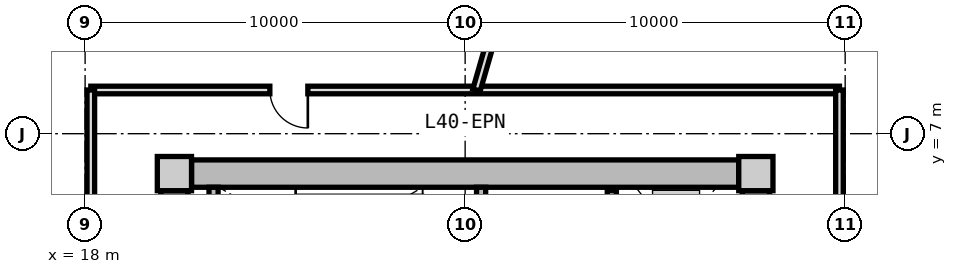
"""IFC4 building model, lengths in metres.
Left out: names, types, materials, properties, quantities, classifications, styles, units other than length and angle.
Written with IfcOpenShell. Run it as: python <this file> out.ifc"""

import sys

from ifc_helpers import new_model, si_unit, direction, frame, frame_2d, origin, origin_2d, place, context, subcontext, project, spatial, rectangle, extrude, source, transform, mapped, element, fill, save


model = new_model("IFC4")
c1 = context("Model", 3, precision=1e-05, world=origin(), true_north=direction((0.0, 1.0)))
c2 = subcontext(c1, "Body", "Model", "MODEL_VIEW")
j1 = project(units=[si_unit("LENGTHUNIT", "METRE"), si_unit("PLANEANGLEUNIT", "RADIAN")], contexts=[c1])
p1 = place(None, origin())
s1 = spatial("IfcSite", under=j1, at=p1, CompositionType="ELEMENT")
p2 = place(p1, origin())
s2 = spatial("IfcBuilding", under=s1, at=p2, CompositionType="ELEMENT")
p3 = place(p2, frame((0.0, 0.0, 129.8)))
s3 = spatial("IfcBuildingStorey", under=s2, at=p3, CompositionType="ELEMENT", Elevation=129.8)
m1 = source(origin(), c2, "Body", "SweptSolid", [
    extrude(rectangle(XDim=0.9, YDim=0.9, at=origin_2d()), origin(), (0.0, 0.0, 1.0), 4.5),
])
for number, where, z_axis, x_axis in (
    (1, (35.65, 5.95, 0.0), (0.0, 0.0, 1.0), (1.0, 0.0, 0.0)),
    (2, (20.35, 5.95, 0.0), (0.0, 0.0, 1.0), (1.0, 0.0, 0.0)),
):
    element("IfcColumn", number, at=place(p3, frame(where, z_axis=z_axis, x_axis=x_axis)), inside=s3, PredefinedType="COLUMN", context=c2, shape_type="MappedRepresentation", body=[
        mapped(m1, transform((0.0, 0.0, 0.0), x_axis=(1.0, 0.0, 0.0), y_axis=(0.0, 1.0, 0.0), z_axis=(0.0, 0.0, 1.0), scale=1.0)),
    ])
m2 = source(origin(), c2, "Body", "SweptSolid", [
    extrude(rectangle(XDim=14.4, YDim=0.72, at=frame_2d((7.2, 0.0))), origin(), (0.0, 0.0, 1.0), 4.08),
])
p4 = place(p3, frame((20.8, 5.95, 0.0), z_axis=(0.0, 0.0, 1.0), x_axis=(1.0, 0.0, 0.0)))
e3 = element("IfcWall", 3, at=p4, inside=s3, PredefinedType="SHEAR", context=c2, shape_type="MappedRepresentation", body=[
    mapped(m2, transform((0.0, 0.0, 0.0), x_axis=(1.0, 0.0, 0.0), y_axis=(0.0, 1.0, 0.0), z_axis=(0.0, 0.0, 1.0), scale=1.0)),
])
m3 = source(origin(), c2, "Body", "SweptSolid", [
    extrude(rectangle(XDim=11.0, YDim=0.72, at=frame_2d((5.5, 0.0))), origin(), (0.0, 0.0, 1.0), 4.08),
])
p5 = place(p3, frame((20.35, -5.5, 0.0), z_axis=(0.0, 0.0, 1.0), x_axis=(0.0, 1.0, 0.0)))
e4 = element("IfcWall", 4, at=p5, inside=s3, PredefinedType="SHEAR", context=c2, shape_type="MappedRepresentation", body=[
    mapped(m3, transform((0.0, 0.0, 0.0), x_axis=(1.0, 0.0, 0.0), y_axis=(0.0, 1.0, 0.0), z_axis=(0.0, 0.0, 1.0), scale=1.0)),
])
p6 = place(p5, frame((3.8, 0.0, 0.0)))
e5 = element("IfcOpeningElement", 5, at=p6, cuts=e4, PredefinedType="OPENING", context=c2, shape_type="SweptSolid", body=[
    extrude(rectangle(XDim=1.2, YDim=2.15, at=frame_2d((0.6, 1.075))), frame((0.0, 0.37, 0.0), z_axis=(0.0, -1.0, 0.0), x_axis=(1.0, 0.0, 0.0)), (0.0, 0.0, 1.0), 0.74),
])
p7 = place(p3, frame((35.65, 5.5, 0.0), z_axis=(0.0, 0.0, 1.0), x_axis=(0.0, -1.0, 0.0)))
e6 = element("IfcWall", 6, at=p7, inside=s3, PredefinedType="SHEAR", context=c2, shape_type="MappedRepresentation", body=[
    mapped(m3, transform((0.0, 0.0, 0.0), x_axis=(1.0, 0.0, 0.0), y_axis=(0.0, 1.0, 0.0), z_axis=(0.0, 0.0, 1.0), scale=1.0)),
])
p8 = place(p7, frame((5.65, 0.0, 0.0)))
e7 = element("IfcOpeningElement", 7, at=p8, cuts=e6, PredefinedType="OPENING", context=c2, shape_type="SweptSolid", body=[
    extrude(rectangle(XDim=1.2, YDim=2.15, at=frame_2d((0.6, 1.075))), frame((0.0, 0.37, 0.0), z_axis=(0.0, -1.0, 0.0), x_axis=(1.0, 0.0, 0.0)), (0.0, 0.0, 1.0), 0.74),
])
p9 = place(p7, frame((9.3, 0.0, 0.0)))
e8 = element("IfcOpeningElement", 8, at=p9, cuts=e6, PredefinedType="OPENING", context=c2, shape_type="SweptSolid", body=[
    extrude(rectangle(XDim=1.0, YDim=2.1, at=frame_2d((0.5, 1.05))), frame((0.0, 0.37, 0.0), z_axis=(0.0, -1.0, 0.0), x_axis=(1.0, 0.0, 0.0)), (0.0, 0.0, 1.0), 0.74),
])
m4 = source(origin(), c2, "Body", "SweptSolid", [
    extrude(rectangle(XDim=3.14, YDim=0.24, at=frame_2d((1.57, 0.0))), origin(), (0.0, 0.0, 1.0), 4.08),
])
p10 = place(p3, frame((21.38, 2.45, 0.0), z_axis=(0.0, 0.0, 1.0), x_axis=(0.0, 1.0, 0.0)))
e9 = element("IfcWall", 9, at=p10, inside=s3, PredefinedType="PARTITIONING", context=c2, shape_type="MappedRepresentation", body=[
    mapped(m4, transform((0.0, 0.0, 0.0), x_axis=(1.0, 0.0, 0.0), y_axis=(0.0, 1.0, 0.0), z_axis=(0.0, 0.0, 1.0), scale=1.0)),
])
p11 = place(p3, frame((28.42, 2.45, 0.0), z_axis=(0.0, 0.0, 1.0), x_axis=(0.0, 1.0, 0.0)))
e10 = element("IfcWall", 10, at=p11, inside=s3, PredefinedType="PARTITIONING", context=c2, shape_type="MappedRepresentation", body=[
    mapped(m4, transform((0.0, 0.0, 0.0), x_axis=(1.0, 0.0, 0.0), y_axis=(0.0, 1.0, 0.0), z_axis=(0.0, 0.0, 1.0), scale=1.0)),
])
p12 = place(p11, frame((0.55, 0.0, 0.0)))
e11 = element("IfcOpeningElement", 11, at=p12, cuts=e10, PredefinedType="OPENING", context=c2, shape_type="SweptSolid", body=[
    extrude(rectangle(XDim=1.1, YDim=2.15, at=frame_2d((0.55, 1.075))), frame((0.0, 0.13, 0.0), z_axis=(0.0, -1.0, 0.0), x_axis=(1.0, 0.0, 0.0)), (0.0, 0.0, 1.0), 0.26),
])
m5 = source(origin(), c2, "Body", "SweptSolid", [
    extrude(rectangle(XDim=5.0, YDim=0.24, at=frame_2d((2.5, 0.0))), origin(), (0.0, 0.0, 1.0), 4.065),
])
p13 = place(p3, frame((31.86, 0.5, 0.0), z_axis=(0.0, 0.0, 1.0), x_axis=(0.0, 1.0, 0.0)))
e12 = element("IfcWall", 12, at=p13, inside=s3, PredefinedType="PARTITIONING", context=c2, shape_type="MappedRepresentation", body=[
    mapped(m5, transform((0.0, 0.0, 0.0), x_axis=(1.0, 0.0, 0.0), y_axis=(0.0, 1.0, 0.0), z_axis=(0.0, 0.0, 1.0), scale=1.0)),
])
p14 = place(p13, frame((3.05, 0.0, 0.0)))
e13 = element("IfcOpeningElement", 13, at=p14, cuts=e12, PredefinedType="OPENING", context=c2, shape_type="SweptSolid", body=[
    extrude(rectangle(XDim=1.3, YDim=2.2, at=frame_2d((0.65, 1.1))), frame((0.0, 0.13, 0.0), z_axis=(0.0, -1.0, 0.0), x_axis=(1.0, 0.0, 0.0)), (0.0, 0.0, 1.0), 0.26),
])
p15 = place(p13, frame((0.55, 0.0, 0.0)))
e14 = element("IfcOpeningElement", 14, at=p15, cuts=e12, PredefinedType="OPENING", context=c2, shape_type="SweptSolid", body=[
    extrude(rectangle(XDim=1.3, YDim=2.2, at=frame_2d((0.65, 1.1))), frame((0.0, 0.13, 0.0), z_axis=(0.0, -1.0, 0.0), x_axis=(1.0, 0.0, 0.0)), (0.0, 0.0, 1.0), 0.26),
])
m6 = source(origin(), c2, "Body", "SweptSolid", [
    extrude(rectangle(XDim=19.7, YDim=0.2, at=frame_2d((9.85, 0.0))), origin(), (0.0, 0.0, 1.0), 4.065),
])
p16 = place(p3, frame((18.15, 8.15, 0.0), z_axis=(0.0, 0.0, 1.0), x_axis=(1.0, 0.0, 0.0)))
e15 = element("IfcWall", 15, at=p16, inside=s3, PredefinedType="PARTITIONING", context=c2, shape_type="MappedRepresentation", body=[
    mapped(m6, transform((0.0, 0.0, 0.0), x_axis=(1.0, 0.0, 0.0), y_axis=(0.0, 1.0, 0.0), z_axis=(0.0, 0.0, 1.0), scale=1.0)),
])
p17 = place(p16, frame((4.711, 0.0, 0.0)))
e16 = element("IfcOpeningElement", 16, at=p17, cuts=e15, PredefinedType="OPENING", context=c2, shape_type="SweptSolid", body=[
    extrude(rectangle(XDim=1.0, YDim=2.1, at=frame_2d((0.5, 1.05))), frame((0.0, 0.11, 0.0), z_axis=(0.0, -1.0, 0.0), x_axis=(1.0, 0.0, 0.0)), (0.0, 0.0, 1.0), 0.22),
])
m7 = source(origin(), c2, "Body", "SweptSolid", [
    extrude(rectangle(XDim=16.3, YDim=0.2, at=frame_2d((8.15, 0.0))), origin(), (0.0, 0.0, 1.0), 4.065),
])
p18 = place(p3, frame((18.15, -8.15, 0.0), z_axis=(0.0, 0.0, 1.0), x_axis=(0.0, 1.0, 0.0)))
e17 = element("IfcWall", 17, at=p18, inside=s3, PredefinedType="PARTITIONING", context=c2, shape_type="MappedRepresentation", body=[
    mapped(m7, transform((0.0, 0.0, 0.0), x_axis=(1.0, 0.0, 0.0), y_axis=(0.0, 1.0, 0.0), z_axis=(0.0, 0.0, 1.0), scale=1.0)),
])
p19 = place(p18, frame((4.697, 0.0, 0.0)))
e18 = element("IfcOpeningElement", 18, at=p19, cuts=e17, PredefinedType="OPENING", context=c2, shape_type="SweptSolid", body=[
    extrude(rectangle(XDim=1.0, YDim=2.1, at=frame_2d((0.5, 1.05))), frame((0.0, 0.11, 0.0), z_axis=(0.0, -1.0, 0.0), x_axis=(1.0, 0.0, 0.0)), (0.0, 0.0, 1.0), 0.22),
])
p20 = place(p3, frame((37.85, 8.15, 0.0), z_axis=(0.0, 0.0, 1.0), x_axis=(0.0, -1.0, 0.0)))
e19 = element("IfcWall", 19, at=p20, inside=s3, PredefinedType="PARTITIONING", context=c2, shape_type="MappedRepresentation", body=[
    mapped(m7, transform((0.0, 0.0, 0.0), x_axis=(1.0, 0.0, 0.0), y_axis=(0.0, 1.0, 0.0), z_axis=(0.0, 0.0, 1.0), scale=1.0)),
])
p21 = place(p20, frame((5.211, 0.0, 0.0)))
e20 = element("IfcOpeningElement", 20, at=p21, cuts=e19, PredefinedType="OPENING", context=c2, shape_type="SweptSolid", body=[
    extrude(rectangle(XDim=1.0, YDim=2.1, at=frame_2d((0.5, 1.05))), frame((0.0, 0.11, 0.0), z_axis=(0.0, -1.0, 0.0), x_axis=(1.0, 0.0, 0.0)), (0.0, 0.0, 1.0), 0.22),
])
m8 = source(origin(), c2, "Body", "SweptSolid", [
    extrude(rectangle(XDim=8.708, YDim=0.2, at=frame_2d((4.354, 0.0))), origin(), (0.0, 0.0, 1.0), 2.515),
])
p22 = place(p3, frame((28.3, 8.15, 0.0), z_axis=(0.0, 0.0, 1.0), x_axis=(0.277019790717, 0.960864212858, 0.0)))
e21 = element("IfcWall", 21, at=p22, inside=s3, PredefinedType="PARTITIONING", context=c2, shape_type="MappedRepresentation", body=[
    mapped(m8, transform((0.0, 0.0, 0.0), x_axis=(1.0, 0.0, 0.0), y_axis=(0.0, 1.0, 0.0), z_axis=(0.0, 0.0, 1.0), scale=1.0)),
])
m9 = source(origin(), c2, "Body", "SweptSolid", [
    extrude(rectangle(XDim=1.0, YDim=2.1, at=frame_2d((0.5, 1.05))), frame((0.0, 0.025, 0.0), z_axis=(0.0, -1.0, 0.0), x_axis=(1.0, 0.0, 0.0)), (0.0, 0.0, 1.0), 0.05),
])
p23 = place(p17, frame((1.0, 0.0, 0.0), z_axis=(0.0, 0.0, 1.0), x_axis=(-1.0, 0.0, 0.0)))
e22 = element("IfcDoor", 22, at=p23, inside=s3, OperationType="SINGLE_SWING_LEFT", PredefinedType="DOOR", context=c2, shape_type="MappedRepresentation", body=[
    mapped(m9, transform((0.0, 0.0, 0.0), x_axis=(1.0, 0.0, 0.0), y_axis=(0.0, 1.0, 0.0), z_axis=(0.0, 0.0, 1.0), scale=1.0)),
])
fill(e16, e22)
save(model, sys.argv[1])
